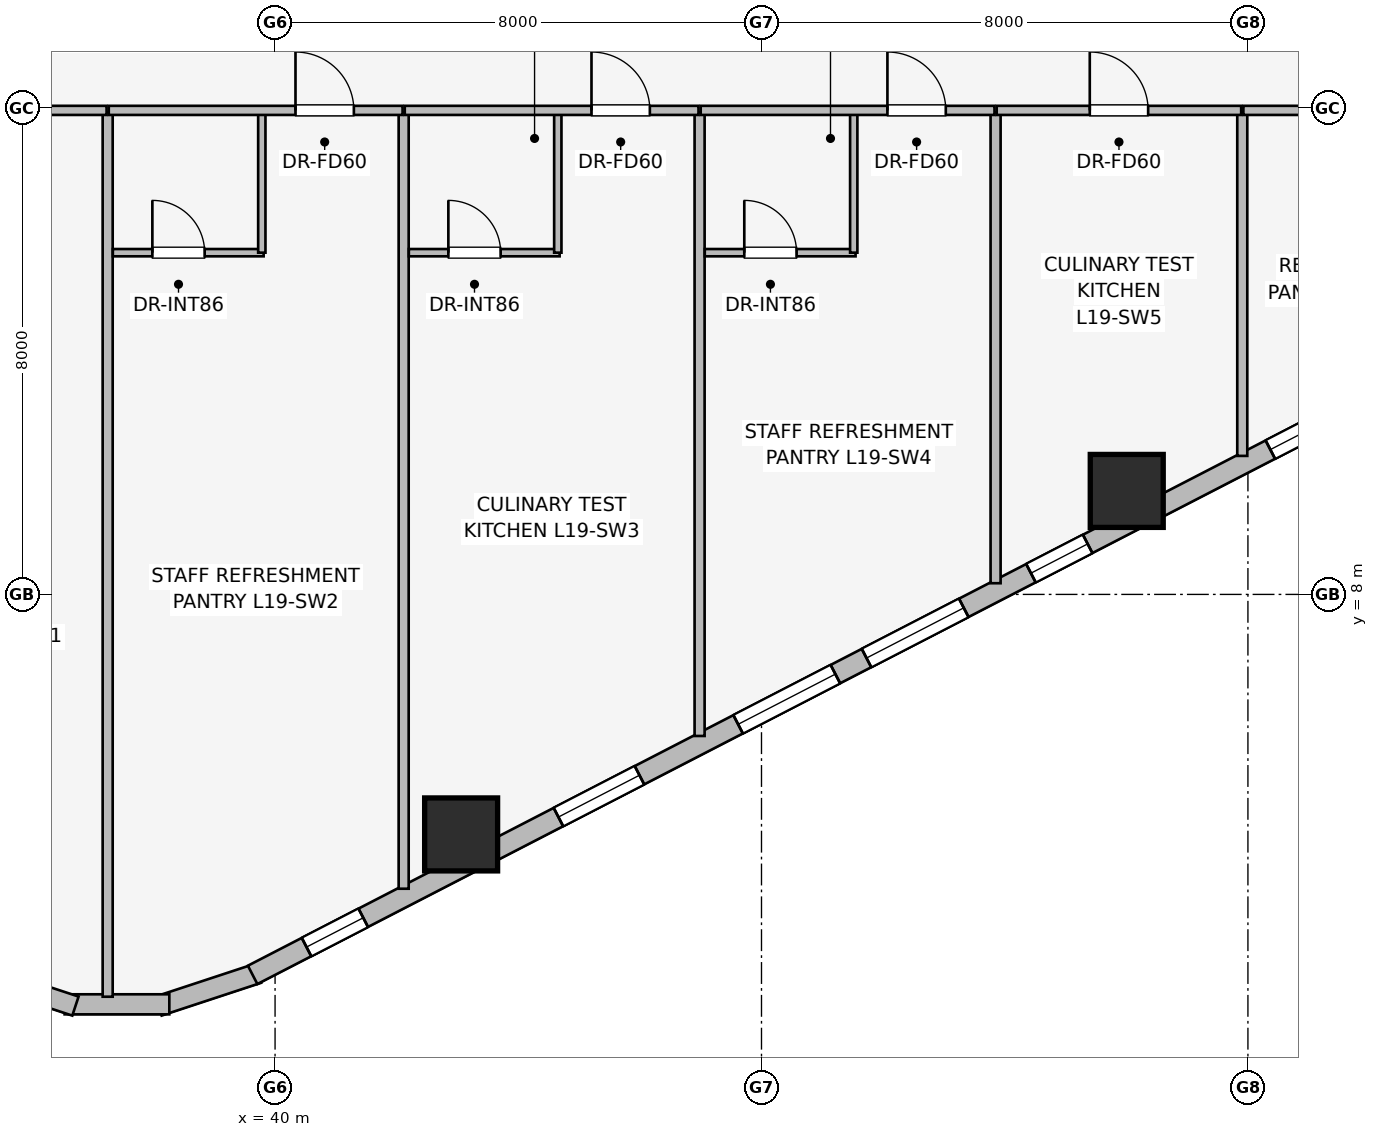
"""IFC4 building model, lengths in metres.
Left out: names, types, materials, properties, quantities, classifications, styles, units other than length and angle.
Written with IfcOpenShell. Run it as: python <this file> out.ifc"""

import sys

from ifc_helpers import new_model, si_unit, direction, frame, frame_2d, origin, origin_2d, place, context, subcontext, project, spatial, rectangle, extrude, element, fill, save


model = new_model("IFC4")
c1 = context("Model", 3, precision=1e-05, world=origin(), true_north=direction((0.0, 1.0)))
c2 = subcontext(c1, "Body", "Model", "MODEL_VIEW")
j1 = project(units=[si_unit("LENGTHUNIT", "METRE"), si_unit("PLANEANGLEUNIT", "RADIAN")], contexts=[c1])
p1 = place(None, origin())
s1 = spatial("IfcSite", under=j1, at=p1, CompositionType="ELEMENT")
p2 = place(p1, origin())
s2 = spatial("IfcBuilding", under=s1, at=p2, CompositionType="ELEMENT")
p3 = place(p2, frame((0.0, 0.0, 74.45)))
s3 = spatial("IfcBuildingStorey", under=s2, at=p3, CompositionType="ELEMENT", Elevation=74.45)
for number, where, z_axis, x_axis in (
    (1, (43.06, 4.053, 0.0), (0.0, 0.0, 1.0), (1.0, 0.0, 0.0)),
    (2, (54.007, 9.702, 0.0), (0.0, 0.0, 1.0), (1.0, 0.0, 0.0)),
):
    element("IfcColumn", number, at=place(p3, frame(where, z_axis=z_axis, x_axis=x_axis)), inside=s3, PredefinedType="COLUMN", context=c2, shape_type="SweptSolid", body=[
        extrude(rectangle(XDim=1.2, YDim=1.2, at=origin_2d()), origin(), (0.0, 0.0, 1.0), 3.65),
    ])
p4 = place(p3, frame((39.719, 1.769, 0.0), z_axis=(0.0, 0.0, 1.0), x_axis=(-0.94976901097, -0.312951794691, 0.0)))
e3 = element("IfcWall", 3, at=p4, inside=s3, PredefinedType="STANDARD", context=c2, shape_type="SweptSolid", body=[
    extrude(rectangle(XDim=1.722, YDim=0.33, at=frame_2d((0.861, 0.0))), origin(), (0.0, 0.0, 1.0), 3.39),
])
p5 = place(p3, frame((38.261, 1.259, 0.0), z_axis=(0.0, 0.0, 1.0), x_axis=(-1.0, 0.0, 0.0)))
e4 = element("IfcWall", 4, at=p5, inside=s3, PredefinedType="STANDARD", context=c2, shape_type="SweptSolid", body=[
    extrude(rectangle(XDim=1.722, YDim=0.33, at=frame_2d((0.861, 0.0))), origin(), (0.0, 0.0, 1.0), 3.39),
])
p6 = place(p3, frame((36.717, 1.23, 0.0), z_axis=(0.0, 0.0, 1.0), x_axis=(-0.94976901097, 0.312951794691, 0.0)))
e5 = element("IfcWall", 5, at=p6, inside=s3, PredefinedType="STANDARD", context=c2, shape_type="SweptSolid", body=[
    extrude(rectangle(XDim=1.722, YDim=0.33, at=frame_2d((0.861, 0.0))), origin(), (0.0, 0.0, 1.0), 3.39),
])
p7 = place(p3, frame((57.876, 11.159, 0.0), z_axis=(0.0, 0.0, 1.0), x_axis=(-0.888634413993, -0.458616264721, 0.0)))
e6 = element("IfcWall", 6, at=p7, inside=s3, PredefinedType="STANDARD", context=c2, shape_type="SweptSolid", body=[
    extrude(rectangle(XDim=20.531, YDim=0.34, at=frame_2d((10.266, 0.0))), origin(), (0.0, 0.0, 1.0), 2.684),
])
p8 = place(p7, frame((0.646, 0.0, 0.75)))
e7 = element("IfcOpeningElement", 7, at=p8, cuts=e6, PredefinedType="OPENING", context=c2, shape_type="SweptSolid", body=[
    extrude(rectangle(XDim=1.05, YDim=1.4, at=frame_2d((0.525, 0.7))), frame((0.0, 0.18, 0.0), z_axis=(0.0, -1.0, 0.0), x_axis=(1.0, 0.0, 0.0)), (0.0, 0.0, 1.0), 0.36),
])
p9 = place(p7, frame((5.077, 0.0, 0.75)))
e8 = element("IfcOpeningElement", 8, at=p9, cuts=e6, PredefinedType="OPENING", context=c2, shape_type="SweptSolid", body=[
    extrude(rectangle(XDim=1.05, YDim=1.4, at=frame_2d((0.525, 0.7))), frame((0.0, 0.18, 0.0), z_axis=(0.0, -1.0, 0.0), x_axis=(1.0, 0.0, 0.0)), (0.0, 0.0, 1.0), 0.36),
])
p10 = place(p7, frame((7.37, 0.0, 0.75)))
e9 = element("IfcOpeningElement", 9, at=p10, cuts=e6, PredefinedType="OPENING", context=c2, shape_type="SweptSolid", body=[
    extrude(rectangle(XDim=1.8, YDim=1.5, at=frame_2d((0.9, 0.75))), frame((0.0, 0.18, 0.0), z_axis=(0.0, -1.0, 0.0), x_axis=(1.0, 0.0, 0.0)), (0.0, 0.0, 1.0), 0.36),
])
p11 = place(p7, frame((9.746, 0.0, 0.75)))
e10 = element("IfcOpeningElement", 10, at=p11, cuts=e6, PredefinedType="OPENING", context=c2, shape_type="SweptSolid", body=[
    extrude(rectangle(XDim=1.8, YDim=1.5, at=frame_2d((0.9, 0.75))), frame((0.0, 0.18, 0.0), z_axis=(0.0, -1.0, 0.0), x_axis=(1.0, 0.0, 0.0)), (0.0, 0.0, 1.0), 0.36),
])
p12 = place(p7, frame((13.372, 0.0, 0.75)))
e11 = element("IfcOpeningElement", 11, at=p12, cuts=e6, PredefinedType="OPENING", context=c2, shape_type="SweptSolid", body=[
    extrude(rectangle(XDim=1.5, YDim=1.5, at=frame_2d((0.75, 0.75))), frame((0.0, 0.18, 0.0), z_axis=(0.0, -1.0, 0.0), x_axis=(1.0, 0.0, 0.0)), (0.0, 0.0, 1.0), 0.36),
])
p13 = place(p7, frame((18.484, 0.0, 0.75)))
e12 = element("IfcOpeningElement", 12, at=p13, cuts=e6, PredefinedType="OPENING", context=c2, shape_type="SweptSolid", body=[
    extrude(rectangle(XDim=1.05, YDim=1.4, at=frame_2d((0.525, 0.7))), frame((0.0, 0.18, 0.0), z_axis=(0.0, -1.0, 0.0), x_axis=(1.0, 0.0, 0.0)), (0.0, 0.0, 1.0), 0.36),
])
p14 = place(p3, frame((37.247, 1.384, 0.0), z_axis=(0.0, 0.0, 1.0), x_axis=(0.0, 1.0, 0.0)))
e13 = element("IfcWall", 13, at=p14, inside=s3, PredefinedType="PARTITIONING", context=c2, shape_type="SweptSolid", body=[
    extrude(rectangle(XDim=14.546, YDim=0.165, at=frame_2d((7.273, 0.0))), origin(), (0.0, 0.0, 1.0), 3.39),
])
p15 = place(p3, frame((42.115, 3.16, 0.0), z_axis=(0.0, 0.0, 1.0), x_axis=(0.0, 1.0, 0.0)))
e14 = element("IfcWall", 14, at=p15, inside=s3, PredefinedType="PARTITIONING", context=c2, shape_type="SweptSolid", body=[
    extrude(rectangle(XDim=12.77, YDim=0.165, at=frame_2d((6.385, 0.0))), origin(), (0.0, 0.0, 1.0), 2.513),
])
p16 = place(p3, frame((46.982, 5.672, 0.0), z_axis=(0.0, 0.0, 1.0), x_axis=(0.0, 1.0, 0.0)))
e15 = element("IfcWall", 15, at=p16, inside=s3, PredefinedType="PARTITIONING", context=c2, shape_type="SweptSolid", body=[
    extrude(rectangle(XDim=10.258, YDim=0.165, at=frame_2d((5.129, 0.0))), origin(), (0.0, 0.0, 1.0), 3.39),
])
p17 = place(p3, frame((51.85, 8.184, 0.0), z_axis=(0.0, 0.0, 1.0), x_axis=(0.0, 1.0, 0.0)))
e16 = element("IfcWall", 16, at=p17, inside=s3, PredefinedType="PARTITIONING", context=c2, shape_type="SweptSolid", body=[
    extrude(rectangle(XDim=7.746, YDim=0.165, at=frame_2d((3.873, 0.0))), origin(), (0.0, 0.0, 1.0), 3.39),
])
p18 = place(p3, frame((55.907, 10.278, 0.0), z_axis=(0.0, 0.0, 1.0), x_axis=(0.0, 1.0, 0.0)))
e17 = element("IfcWall", 17, at=p18, inside=s3, PredefinedType="PARTITIONING", context=c2, shape_type="SweptSolid", body=[
    extrude(rectangle(XDim=5.652, YDim=0.165, at=frame_2d((2.826, 0.0))), origin(), (0.0, 0.0, 1.0), 3.39),
])
p19 = place(p3, frame((32.85, 15.96, 0.0), z_axis=(0.0, 0.0, 1.0), x_axis=(1.0, 0.0, 0.0)))
e18 = element("IfcWall", 18, at=p19, inside=s3, PredefinedType="PARTITIONING", context=c2, shape_type="SweptSolid", body=[
    extrude(rectangle(XDim=4.379, YDim=0.15, at=frame_2d((2.189, 0.0))), origin(), (0.0, 0.0, 1.0), 3.39),
])
p20 = place(p19, frame((1.71, 0.0, 0.0)))
e19 = element("IfcOpeningElement", 19, at=p20, cuts=e18, PredefinedType="OPENING", context=c2, shape_type="SweptSolid", body=[
    extrude(rectangle(XDim=0.96, YDim=2.0, at=frame_2d((0.48, 1.0))), frame((0.0, 0.085, 0.0), z_axis=(0.0, -1.0, 0.0), x_axis=(1.0, 0.0, 0.0)), (0.0, 0.0, 1.0), 0.17),
])
p21 = place(p3, frame((37.332, 13.62, 0.0), z_axis=(0.0, 0.0, 1.0), x_axis=(1.0, 0.0, 0.0)))
e20 = element("IfcWall", 20, at=p21, inside=s3, PredefinedType="PARTITIONING", context=c2, shape_type="SweptSolid", body=[
    extrude(rectangle(XDim=2.48, YDim=0.12, at=frame_2d((1.24, 0.0))), origin(), (0.0, 0.0, 1.0), 3.39),
])
p22 = place(p21, frame((0.65, 0.0, 0.0)))
e21 = element("IfcOpeningElement", 21, at=p22, cuts=e20, PredefinedType="OPENING", context=c2, shape_type="SweptSolid", body=[
    extrude(rectangle(XDim=0.86, YDim=2.0, at=frame_2d((0.43, 1.0))), frame((0.0, 0.07, 0.0), z_axis=(0.0, -1.0, 0.0), x_axis=(1.0, 0.0, 0.0)), (0.0, 0.0, 1.0), 0.14),
])
p23 = place(p3, frame((39.782, 13.62, 0.0), z_axis=(0.0, 0.0, 1.0), x_axis=(0.0, 1.0, 0.0)))
e22 = element("IfcWall", 22, at=p23, inside=s3, PredefinedType="PARTITIONING", context=c2, shape_type="SweptSolid", body=[
    extrude(rectangle(XDim=2.3, YDim=0.12, at=frame_2d((1.15, 0.0))), origin(), (0.0, 0.0, 1.0), 2.513),
])
p24 = place(p3, frame((37.265, 15.96, 0.0), z_axis=(0.0, 0.0, 1.0), x_axis=(1.0, 0.0, 0.0)))
e23 = element("IfcWall", 23, at=p24, inside=s3, PredefinedType="PARTITIONING", context=c2, shape_type="SweptSolid", body=[
    extrude(rectangle(XDim=4.832, YDim=0.15, at=frame_2d((2.416, 0.0))), origin(), (0.0, 0.0, 1.0), 3.39),
])
p25 = place(p24, frame((3.071, 0.0, 0.0)))
e24 = element("IfcOpeningElement", 24, at=p25, cuts=e23, PredefinedType="OPENING", context=c2, shape_type="SweptSolid", body=[
    extrude(rectangle(XDim=0.96, YDim=2.0, at=frame_2d((0.48, 1.0))), frame((0.0, 0.085, 0.0), z_axis=(0.0, -1.0, 0.0), x_axis=(1.0, 0.0, 0.0)), (0.0, 0.0, 1.0), 0.17),
])
p26 = place(p3, frame((42.2, 13.62, 0.0), z_axis=(0.0, 0.0, 1.0), x_axis=(1.0, 0.0, 0.0)))
e25 = element("IfcWall", 25, at=p26, inside=s3, PredefinedType="PARTITIONING", context=c2, shape_type="SweptSolid", body=[
    extrude(rectangle(XDim=2.48, YDim=0.12, at=frame_2d((1.24, 0.0))), origin(), (0.0, 0.0, 1.0), 3.39),
])
p27 = place(p26, frame((0.65, 0.0, 0.0)))
e26 = element("IfcOpeningElement", 26, at=p27, cuts=e25, PredefinedType="OPENING", context=c2, shape_type="SweptSolid", body=[
    extrude(rectangle(XDim=0.86, YDim=2.0, at=frame_2d((0.43, 1.0))), frame((0.0, 0.07, 0.0), z_axis=(0.0, -1.0, 0.0), x_axis=(1.0, 0.0, 0.0)), (0.0, 0.0, 1.0), 0.14),
])
p28 = place(p3, frame((44.65, 13.62, 0.0), z_axis=(0.0, 0.0, 1.0), x_axis=(0.0, 1.0, 0.0)))
e27 = element("IfcWall", 27, at=p28, inside=s3, PredefinedType="PARTITIONING", context=c2, shape_type="SweptSolid", body=[
    extrude(rectangle(XDim=2.3, YDim=0.12, at=frame_2d((1.15, 0.0))), origin(), (0.0, 0.0, 1.0), 3.39),
])
p29 = place(p3, frame((42.133, 15.96, 0.0), z_axis=(0.0, 0.0, 1.0), x_axis=(1.0, 0.0, 0.0)))
e28 = element("IfcWall", 28, at=p29, inside=s3, PredefinedType="PARTITIONING", context=c2, shape_type="SweptSolid", body=[
    extrude(rectangle(XDim=4.831, YDim=0.15, at=frame_2d((2.416, 0.0))), origin(), (0.0, 0.0, 1.0), 3.39),
])
p30 = place(p29, frame((3.071, 0.0, 0.0)))
e29 = element("IfcOpeningElement", 29, at=p30, cuts=e28, PredefinedType="OPENING", context=c2, shape_type="SweptSolid", body=[
    extrude(rectangle(XDim=0.96, YDim=2.0, at=frame_2d((0.48, 1.0))), frame((0.0, 0.085, 0.0), z_axis=(0.0, -1.0, 0.0), x_axis=(1.0, 0.0, 0.0)), (0.0, 0.0, 1.0), 0.17),
])
p31 = place(p3, frame((47.067, 13.62, 0.0), z_axis=(0.0, 0.0, 1.0), x_axis=(1.0, 0.0, 0.0)))
e30 = element("IfcWall", 30, at=p31, inside=s3, PredefinedType="PARTITIONING", context=c2, shape_type="SweptSolid", body=[
    extrude(rectangle(XDim=2.48, YDim=0.12, at=frame_2d((1.24, 0.0))), origin(), (0.0, 0.0, 1.0), 3.39),
])
p32 = place(p31, frame((0.65, 0.0, 0.0)))
e31 = element("IfcOpeningElement", 31, at=p32, cuts=e30, PredefinedType="OPENING", context=c2, shape_type="SweptSolid", body=[
    extrude(rectangle(XDim=0.86, YDim=2.0, at=frame_2d((0.43, 1.0))), frame((0.0, 0.07, 0.0), z_axis=(0.0, -1.0, 0.0), x_axis=(1.0, 0.0, 0.0)), (0.0, 0.0, 1.0), 0.14),
])
p33 = place(p3, frame((49.517, 13.62, 0.0), z_axis=(0.0, 0.0, 1.0), x_axis=(0.0, 1.0, 0.0)))
e32 = element("IfcWall", 32, at=p33, inside=s3, PredefinedType="PARTITIONING", context=c2, shape_type="SweptSolid", body=[
    extrude(rectangle(XDim=2.3, YDim=0.12, at=frame_2d((1.15, 0.0))), origin(), (0.0, 0.0, 1.0), 3.39),
])
p34 = place(p3, frame((47.0, 15.96, 0.0), z_axis=(0.0, 0.0, 1.0), x_axis=(1.0, 0.0, 0.0)))
e33 = element("IfcWall", 33, at=p34, inside=s3, PredefinedType="PARTITIONING", context=c2, shape_type="SweptSolid", body=[
    extrude(rectangle(XDim=4.832, YDim=0.15, at=frame_2d((2.416, 0.0))), origin(), (0.0, 0.0, 1.0), 3.39),
])
p35 = place(p34, frame((3.071, 0.0, 0.0)))
e34 = element("IfcOpeningElement", 34, at=p35, cuts=e33, PredefinedType="OPENING", context=c2, shape_type="SweptSolid", body=[
    extrude(rectangle(XDim=0.96, YDim=2.0, at=frame_2d((0.48, 1.0))), frame((0.0, 0.085, 0.0), z_axis=(0.0, -1.0, 0.0), x_axis=(1.0, 0.0, 0.0)), (0.0, 0.0, 1.0), 0.17),
])
p36 = place(p3, frame((51.868, 15.96, 0.0), z_axis=(0.0, 0.0, 1.0), x_axis=(1.0, 0.0, 0.0)))
e35 = element("IfcWall", 35, at=p36, inside=s3, PredefinedType="PARTITIONING", context=c2, shape_type="SweptSolid", body=[
    extrude(rectangle(XDim=4.021, YDim=0.15, at=frame_2d((2.01, 0.0))), origin(), (0.0, 0.0, 1.0), 3.39),
])
p37 = place(p36, frame((1.531, 0.0, 0.0)))
e36 = element("IfcOpeningElement", 36, at=p37, cuts=e35, PredefinedType="OPENING", context=c2, shape_type="SweptSolid", body=[
    extrude(rectangle(XDim=0.96, YDim=2.0, at=frame_2d((0.48, 1.0))), frame((0.0, 0.085, 0.0), z_axis=(0.0, -1.0, 0.0), x_axis=(1.0, 0.0, 0.0)), (0.0, 0.0, 1.0), 0.17),
])
p38 = place(p3, frame((55.925, 15.96, 0.0), z_axis=(0.0, 0.0, 1.0), x_axis=(1.0, 0.0, 0.0)))
e37 = element("IfcWall", 37, at=p38, inside=s3, PredefinedType="PARTITIONING", context=c2, shape_type="SweptSolid", body=[
    extrude(rectangle(XDim=4.328, YDim=0.15, at=frame_2d((2.164, 0.0))), origin(), (0.0, 0.0, 1.0), 3.39),
])
p39 = place(p38, frame((1.698, 0.0, 0.0)))
e38 = element("IfcOpeningElement", 38, at=p39, cuts=e37, PredefinedType="OPENING", context=c2, shape_type="SweptSolid", body=[
    extrude(rectangle(XDim=0.96, YDim=2.0, at=frame_2d((0.48, 1.0))), frame((0.0, 0.085, 0.0), z_axis=(0.0, -1.0, 0.0), x_axis=(1.0, 0.0, 0.0)), (0.0, 0.0, 1.0), 0.17),
])
p40 = place(p8, origin())
e39 = element("IfcWindow", 39, at=p40, inside=s3, PartitioningType="SINGLE_PANEL", PredefinedType="WINDOW", context=c2, shape_type="SweptSolid", body=[
    extrude(rectangle(XDim=1.05, YDim=1.4, at=frame_2d((0.525, 0.7))), frame((0.0, 0.03, 0.0), z_axis=(0.0, -1.0, 0.0), x_axis=(1.0, 0.0, 0.0)), (0.0, 0.0, 1.0), 0.06),
])
fill(e7, e39)
p41 = place(p9, origin())
e40 = element("IfcWindow", 40, at=p41, inside=s3, PartitioningType="SINGLE_PANEL", PredefinedType="WINDOW", context=c2, shape_type="SweptSolid", body=[
    extrude(rectangle(XDim=1.05, YDim=1.4, at=frame_2d((0.525, 0.7))), frame((0.0, 0.03, 0.0), z_axis=(0.0, -1.0, 0.0), x_axis=(1.0, 0.0, 0.0)), (0.0, 0.0, 1.0), 0.06),
])
fill(e8, e40)
p42 = place(p10, origin())
e41 = element("IfcWindow", 41, at=p42, inside=s3, PartitioningType="SINGLE_PANEL", PredefinedType="WINDOW", context=c2, shape_type="SweptSolid", body=[
    extrude(rectangle(XDim=1.8, YDim=1.5, at=frame_2d((0.9, 0.75))), frame((0.0, 0.03, 0.0), z_axis=(0.0, -1.0, 0.0), x_axis=(1.0, 0.0, 0.0)), (0.0, 0.0, 1.0), 0.06),
])
fill(e9, e41)
p43 = place(p11, origin())
e42 = element("IfcWindow", 42, at=p43, inside=s3, PartitioningType="SINGLE_PANEL", PredefinedType="WINDOW", context=c2, shape_type="SweptSolid", body=[
    extrude(rectangle(XDim=1.8, YDim=1.5, at=frame_2d((0.9, 0.75))), frame((0.0, 0.03, 0.0), z_axis=(0.0, -1.0, 0.0), x_axis=(1.0, 0.0, 0.0)), (0.0, 0.0, 1.0), 0.06),
])
fill(e10, e42)
p44 = place(p12, origin())
e43 = element("IfcWindow", 43, at=p44, inside=s3, PartitioningType="SINGLE_PANEL", PredefinedType="WINDOW", context=c2, shape_type="SweptSolid", body=[
    extrude(rectangle(XDim=1.5, YDim=1.5, at=frame_2d((0.75, 0.75))), frame((0.0, 0.03, 0.0), z_axis=(0.0, -1.0, 0.0), x_axis=(1.0, 0.0, 0.0)), (0.0, 0.0, 1.0), 0.06),
])
fill(e11, e43)
p45 = place(p13, origin())
e44 = element("IfcWindow", 44, at=p45, inside=s3, PartitioningType="SINGLE_PANEL", PredefinedType="WINDOW", context=c2, shape_type="SweptSolid", body=[
    extrude(rectangle(XDim=1.05, YDim=1.4, at=frame_2d((0.525, 0.7))), frame((0.0, 0.03, 0.0), z_axis=(0.0, -1.0, 0.0), x_axis=(1.0, 0.0, 0.0)), (0.0, 0.0, 1.0), 0.06),
])
fill(e12, e44)
p46 = place(p22, origin())
e45 = element("IfcDoor", 45, at=p46, inside=s3, OperationType="SINGLE_SWING_LEFT", PredefinedType="DOOR", context=c2, shape_type="SweptSolid", body=[
    extrude(rectangle(XDim=0.86, YDim=2.0, at=frame_2d((0.43, 1.0))), frame((0.0, 0.025, 0.0), z_axis=(0.0, -1.0, 0.0), x_axis=(1.0, 0.0, 0.0)), (0.0, 0.0, 1.0), 0.05),
])
fill(e21, e45)
p47 = place(p25, origin())
e46 = element("IfcDoor", 46, at=p47, inside=s3, OperationType="SINGLE_SWING_LEFT", PredefinedType="DOOR", context=c2, shape_type="SweptSolid", body=[
    extrude(rectangle(XDim=0.96, YDim=2.0, at=frame_2d((0.48, 1.0))), frame((0.0, 0.025, 0.0), z_axis=(0.0, -1.0, 0.0), x_axis=(1.0, 0.0, 0.0)), (0.0, 0.0, 1.0), 0.05),
])
fill(e24, e46)
p48 = place(p27, origin())
e47 = element("IfcDoor", 47, at=p48, inside=s3, OperationType="SINGLE_SWING_LEFT", PredefinedType="DOOR", context=c2, shape_type="SweptSolid", body=[
    extrude(rectangle(XDim=0.86, YDim=2.0, at=frame_2d((0.43, 1.0))), frame((0.0, 0.025, 0.0), z_axis=(0.0, -1.0, 0.0), x_axis=(1.0, 0.0, 0.0)), (0.0, 0.0, 1.0), 0.05),
])
fill(e26, e47)
p49 = place(p30, origin())
e48 = element("IfcDoor", 48, at=p49, inside=s3, OperationType="SINGLE_SWING_LEFT", PredefinedType="DOOR", context=c2, shape_type="SweptSolid", body=[
    extrude(rectangle(XDim=0.96, YDim=2.0, at=frame_2d((0.48, 1.0))), frame((0.0, 0.025, 0.0), z_axis=(0.0, -1.0, 0.0), x_axis=(1.0, 0.0, 0.0)), (0.0, 0.0, 1.0), 0.05),
])
fill(e29, e48)
p50 = place(p32, origin())
e49 = element("IfcDoor", 49, at=p50, inside=s3, OperationType="SINGLE_SWING_LEFT", PredefinedType="DOOR", context=c2, shape_type="SweptSolid", body=[
    extrude(rectangle(XDim=0.86, YDim=2.0, at=frame_2d((0.43, 1.0))), frame((0.0, 0.025, 0.0), z_axis=(0.0, -1.0, 0.0), x_axis=(1.0, 0.0, 0.0)), (0.0, 0.0, 1.0), 0.05),
])
fill(e31, e49)
p51 = place(p35, origin())
e50 = element("IfcDoor", 50, at=p51, inside=s3, OperationType="SINGLE_SWING_LEFT", PredefinedType="DOOR", context=c2, shape_type="SweptSolid", body=[
    extrude(rectangle(XDim=0.96, YDim=2.0, at=frame_2d((0.48, 1.0))), frame((0.0, 0.025, 0.0), z_axis=(0.0, -1.0, 0.0), x_axis=(1.0, 0.0, 0.0)), (0.0, 0.0, 1.0), 0.05),
])
fill(e34, e50)
p52 = place(p37, origin())
e51 = element("IfcDoor", 51, at=p52, inside=s3, OperationType="SINGLE_SWING_LEFT", PredefinedType="DOOR", context=c2, shape_type="SweptSolid", body=[
    extrude(rectangle(XDim=0.96, YDim=2.0, at=frame_2d((0.48, 1.0))), frame((0.0, 0.025, 0.0), z_axis=(0.0, -1.0, 0.0), x_axis=(1.0, 0.0, 0.0)), (0.0, 0.0, 1.0), 0.05),
])
fill(e36, e51)
save(model, sys.argv[1])
